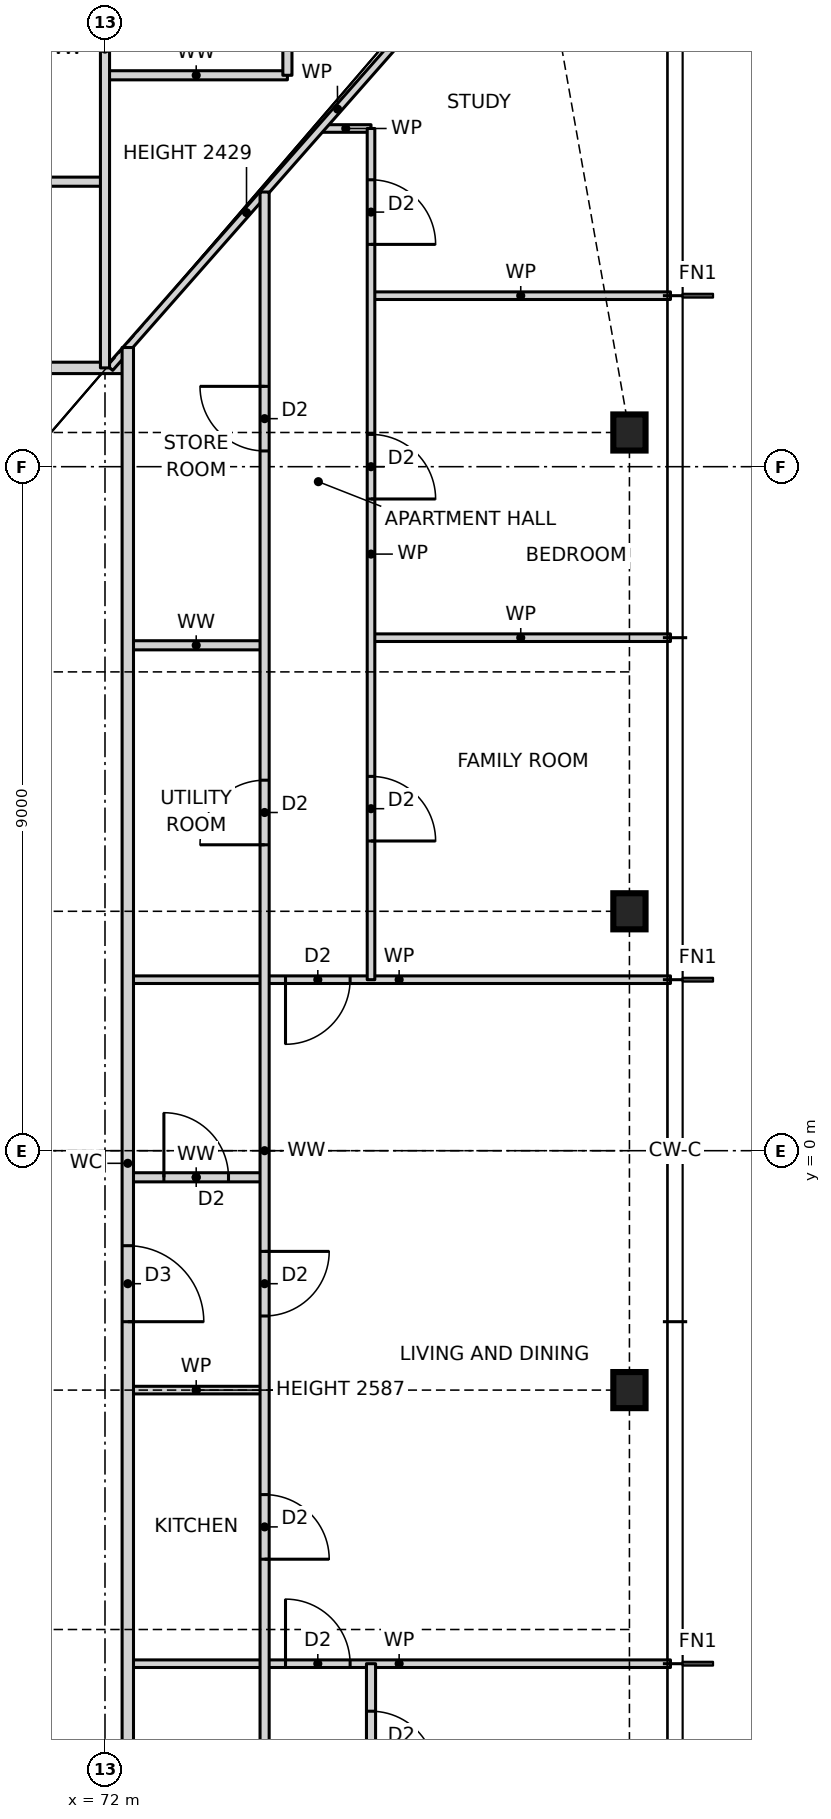
"""IFC4 building model, lengths in metres.
Left out: names, types, materials, properties, quantities, classifications, styles, units other than length and angle.
Written with IfcOpenShell. Run it as: python <this file> out.ifc"""

import sys

from ifc_helpers import new_model, si_unit, direction, frame, frame_2d, origin, origin_2d, place, context, subcontext, project, spatial, rectangle, i_section, extrude, element, fill, save


model = new_model("IFC4")
c1 = context("Model", 3, precision=1e-05, world=origin(), true_north=direction((0.0, 1.0)))
c2 = subcontext(c1, "Body", "Model", "MODEL_VIEW")
j1 = project(units=[si_unit("LENGTHUNIT", "METRE"), si_unit("PLANEANGLEUNIT", "RADIAN")], contexts=[c1])
p1 = place(None, origin())
s1 = spatial("IfcSite", under=j1, at=p1, CompositionType="ELEMENT")
p2 = place(p1, origin())
s2 = spatial("IfcBuilding", under=s1, at=p2, CompositionType="ELEMENT")
p3 = place(p2, frame((0.0, 0.0, 60.5)))
s3 = spatial("IfcBuildingStorey", under=s2, at=p3, CompositionType="ELEMENT", Elevation=60.5)
for number, where, z_axis, x_axis in (
    (1, (78.9, -3.15, 0.0), (0.0, 0.0, 1.0), (1.0, 0.0, 0.0)),
    (2, (78.9, 3.15, 0.0), (0.0, 0.0, 1.0), (1.0, 0.0, 0.0)),
    (3, (78.9, 9.45, 0.0), (0.0, 0.0, 1.0), (1.0, 0.0, 0.0)),
):
    element("IfcColumn", number, at=place(p3, frame(where, z_axis=z_axis, x_axis=x_axis)), inside=s3, PredefinedType="COLUMN", context=c2, shape_type="SweptSolid", body=[
        extrude(i_section(OverallWidth=0.424, OverallDepth=0.475, WebThickness=0.048, FlangeThickness=0.077, at=origin_2d()), origin(), (0.0, 0.0, 1.0), 3.5),
    ])
p4 = place(p3, frame((72.3, -6.75, 0.0), z_axis=(0.0, 0.0, 1.0), x_axis=(1.0, 0.0, 0.0)))
e4 = element("IfcWall", 4, at=p4, inside=s3, PredefinedType="PARTITIONING", context=c2, shape_type="SweptSolid", body=[
    extrude(rectangle(XDim=7.14, YDim=0.1, at=frame_2d((3.57, 0.0))), origin(), (0.0, 0.0, 1.0), 3.27),
])
p5 = place(p4, frame((2.075, 0.0, 0.0)))
e5 = element("IfcOpeningElement", 5, at=p5, cuts=e4, PredefinedType="OPENING", context=c2, shape_type="SweptSolid", body=[
    extrude(rectangle(XDim=0.85, YDim=2.1, at=frame_2d((0.425, 1.05))), frame((0.0, 0.06, 0.0), z_axis=(0.0, -1.0, 0.0), x_axis=(1.0, 0.0, 0.0)), (0.0, 0.0, 1.0), 0.12),
])
p6 = place(p3, frame((72.3, -3.15, 0.0), z_axis=(0.0, 0.0, 1.0), x_axis=(1.0, 0.0, 0.0)))
e6 = element("IfcWall", 6, at=p6, inside=s3, PredefinedType="PARTITIONING", context=c2, shape_type="SweptSolid", body=[
    extrude(rectangle(XDim=1.8, YDim=0.1, at=frame_2d((0.9, 0.0))), origin(), (0.0, 0.0, 1.0), 2.587),
])
p7 = place(p3, frame((72.3, -0.35, 0.0), z_axis=(0.0, 0.0, 1.0), x_axis=(1.0, 0.0, 0.0)))
e7 = element("IfcWall", 7, at=p7, inside=s3, PredefinedType="PARTITIONING", context=c2, shape_type="SweptSolid", body=[
    extrude(rectangle(XDim=1.8, YDim=0.12, at=frame_2d((0.9, 0.0))), origin(), (0.0, 0.0, 1.0), 3.27),
])
p8 = place(p7, frame((0.475, 0.0, 0.0)))
e8 = element("IfcOpeningElement", 8, at=p8, cuts=e7, PredefinedType="OPENING", context=c2, shape_type="SweptSolid", body=[
    extrude(rectangle(XDim=0.85, YDim=2.1, at=frame_2d((0.425, 1.05))), frame((0.0, 0.07, 0.0), z_axis=(0.0, -1.0, 0.0), x_axis=(1.0, 0.0, 0.0)), (0.0, 0.0, 1.0), 0.14),
])
p9 = place(p3, frame((72.3, 2.25, 0.0), z_axis=(0.0, 0.0, 1.0), x_axis=(1.0, 0.0, 0.0)))
e9 = element("IfcWall", 9, at=p9, inside=s3, PredefinedType="PARTITIONING", context=c2, shape_type="SweptSolid", body=[
    extrude(rectangle(XDim=7.14, YDim=0.1, at=frame_2d((3.57, 0.0))), origin(), (0.0, 0.0, 1.0), 3.27),
])
p10 = place(p9, frame((2.075, 0.0, 0.0)))
e10 = element("IfcOpeningElement", 10, at=p10, cuts=e9, PredefinedType="OPENING", context=c2, shape_type="SweptSolid", body=[
    extrude(rectangle(XDim=0.85, YDim=2.1, at=frame_2d((0.425, 1.05))), frame((0.0, 0.06, 0.0), z_axis=(0.0, -1.0, 0.0), x_axis=(1.0, 0.0, 0.0)), (0.0, 0.0, 1.0), 0.12),
])
p11 = place(p3, frame((72.3, 6.65, 0.0), z_axis=(0.0, 0.0, 1.0), x_axis=(1.0, 0.0, 0.0)))
e11 = element("IfcWall", 11, at=p11, inside=s3, PredefinedType="PARTITIONING", context=c2, shape_type="SweptSolid", body=[
    extrude(rectangle(XDim=1.8, YDim=0.12, at=frame_2d((0.9, 0.0))), origin(), (0.0, 0.0, 1.0), 3.27),
])
p12 = place(p3, frame((75.5, 6.75, 0.0), z_axis=(0.0, 0.0, 1.0), x_axis=(1.0, 0.0, 0.0)))
e12 = element("IfcWall", 12, at=p12, inside=s3, PredefinedType="PARTITIONING", context=c2, shape_type="SweptSolid", body=[
    extrude(rectangle(XDim=3.94, YDim=0.1, at=frame_2d((1.97, 0.0))), origin(), (0.0, 0.0, 1.0), 3.27),
])
p13 = place(p3, frame((53.7, 10.3, 0.0), z_axis=(0.0, 0.0, 1.0), x_axis=(1.0, 0.0, 0.0)))
e13 = element("IfcWall", 13, at=p13, inside=s3, PredefinedType="PARTITIONING", context=c2, shape_type="SweptSolid", body=[
    extrude(rectangle(XDim=18.6, YDim=0.15, at=frame_2d((9.3, 0.0))), origin(), (0.0, 0.0, 1.0), 3.27),
])
p14 = place(p13, frame((12.8, 0.0, 0.0)))
e14 = element("IfcOpeningElement", 14, at=p14, cuts=e13, PredefinedType="OPENING", context=c2, shape_type="SweptSolid", body=[
    extrude(rectangle(XDim=1.0, YDim=2.1, at=frame_2d((0.5, 1.05))), frame((0.0, 0.085, 0.0), z_axis=(0.0, -1.0, 0.0), x_axis=(1.0, 0.0, 0.0)), (0.0, 0.0, 1.0), 0.17),
])
p15 = place(p3, frame((75.5, 11.25, 0.0), z_axis=(0.0, 0.0, 1.0), x_axis=(1.0, 0.0, 0.0)))
e15 = element("IfcWall", 15, at=p15, inside=s3, PredefinedType="PARTITIONING", context=c2, shape_type="SweptSolid", body=[
    extrude(rectangle(XDim=3.94, YDim=0.1, at=frame_2d((1.97, 0.0))), origin(), (0.0, 0.0, 1.0), 3.27),
])
p16 = place(p3, frame((51.8, 12.75, 0.0), z_axis=(0.0, 0.0, 1.0), x_axis=(1.0, 0.0, 0.0)))
e16 = element("IfcWall", 16, at=p16, inside=s3, PredefinedType="PARTITIONING", context=c2, shape_type="SweptSolid", body=[
    extrude(rectangle(XDim=20.2, YDim=0.12, at=frame_2d((10.1, 0.0))), origin(), (0.0, 0.0, 1.0), 3.27),
])
p17 = place(p16, frame((17.975, 0.0, 0.0)))
e17 = element("IfcOpeningElement", 17, at=p17, cuts=e16, PredefinedType="OPENING", context=c2, shape_type="SweptSolid", body=[
    extrude(rectangle(XDim=0.85, YDim=2.1, at=frame_2d((0.425, 1.05))), frame((0.0, 0.07, 0.0), z_axis=(0.0, -1.0, 0.0), x_axis=(1.0, 0.0, 0.0)), (0.0, 0.0, 1.0), 0.14),
])
p18 = place(p16, frame((14.775, 0.0, 0.0)))
e18 = element("IfcOpeningElement", 18, at=p18, cuts=e16, PredefinedType="OPENING", context=c2, shape_type="SweptSolid", body=[
    extrude(rectangle(XDim=0.85, YDim=2.1, at=frame_2d((0.425, 1.05))), frame((0.0, 0.07, 0.0), z_axis=(0.0, -1.0, 0.0), x_axis=(1.0, 0.0, 0.0)), (0.0, 0.0, 1.0), 0.14),
])
p19 = place(p16, frame((9.125, 0.0, 0.0)))
e19 = element("IfcOpeningElement", 19, at=p19, cuts=e16, PredefinedType="OPENING", context=c2, shape_type="SweptSolid", body=[
    extrude(rectangle(XDim=0.85, YDim=2.1, at=frame_2d((0.425, 1.05))), frame((0.0, 0.07, 0.0), z_axis=(0.0, -1.0, 0.0), x_axis=(1.0, 0.0, 0.0)), (0.0, 0.0, 1.0), 0.14),
])
p20 = place(p16, frame((3.525, 0.0, 0.0)))
e20 = element("IfcOpeningElement", 20, at=p20, cuts=e16, PredefinedType="OPENING", context=c2, shape_type="SweptSolid", body=[
    extrude(rectangle(XDim=0.85, YDim=2.1, at=frame_2d((0.425, 1.05))), frame((0.0, 0.07, 0.0), z_axis=(0.0, -1.0, 0.0), x_axis=(1.0, 0.0, 0.0)), (0.0, 0.0, 1.0), 0.14),
])
p21 = place(p3, frame((74.836, 13.45, 0.0), z_axis=(0.0, 0.0, 1.0), x_axis=(1.0, 0.0, 0.0)))
e21 = element("IfcWall", 21, at=p21, inside=s3, PredefinedType="PARTITIONING", context=c2, shape_type="SweptSolid", body=[
    extrude(rectangle(XDim=0.664, YDim=0.1, at=frame_2d((0.332, 0.0))), origin(), (0.0, 0.0, 1.0), 3.27),
])
p22 = place(p3, frame((72.0, 14.15, 0.0), z_axis=(0.0, 0.0, 1.0), x_axis=(1.0, 0.0, 0.0)))
e22 = element("IfcWall", 22, at=p22, inside=s3, PredefinedType="PARTITIONING", context=c2, shape_type="SweptSolid", body=[
    extrude(rectangle(XDim=2.4, YDim=0.12, at=frame_2d((1.2, 0.0))), origin(), (0.0, 0.0, 1.0), 3.27),
])
p23 = place(p3, frame((72.064, 10.3, 0.0), z_axis=(0.0, 0.0, 1.0), x_axis=(0.660700699661, 0.750649442461, 0.0)))
e23 = element("IfcWall", 23, at=p23, inside=s3, PredefinedType="PARTITIONING", context=c2, shape_type="SweptSolid", body=[
    extrude(rectangle(XDim=9.071, YDim=0.1, at=frame_2d((4.535, 0.0))), origin(), (0.0, 0.0, 1.0), 2.429),
])
p24 = place(p3, frame((75.5, -13.45, 0.0), z_axis=(0.0, 0.0, 1.0), x_axis=(0.0, 1.0, 0.0)))
e24 = element("IfcWall", 24, at=p24, inside=s3, PredefinedType="PARTITIONING", context=c2, shape_type="SweptSolid", body=[
    extrude(rectangle(XDim=6.7, YDim=0.12, at=frame_2d((3.35, 0.0))), origin(), (0.0, 0.0, 1.0), 3.27),
])
p25 = place(p24, frame((5.225, 0.0, 0.0)))
e25 = element("IfcOpeningElement", 25, at=p25, cuts=e24, PredefinedType="OPENING", context=c2, shape_type="SweptSolid", body=[
    extrude(rectangle(XDim=0.85, YDim=2.1, at=frame_2d((0.425, 1.05))), frame((0.0, 0.07, 0.0), z_axis=(0.0, -1.0, 0.0), x_axis=(1.0, 0.0, 0.0)), (0.0, 0.0, 1.0), 0.14),
])
p26 = place(p24, frame((0.675, 0.0, 0.0)))
e26 = element("IfcOpeningElement", 26, at=p26, cuts=e24, PredefinedType="OPENING", context=c2, shape_type="SweptSolid", body=[
    extrude(rectangle(XDim=0.85, YDim=2.1, at=frame_2d((0.425, 1.05))), frame((0.0, 0.07, 0.0), z_axis=(0.0, -1.0, 0.0), x_axis=(1.0, 0.0, 0.0)), (0.0, 0.0, 1.0), 0.14),
])
p27 = place(p3, frame((75.5, 2.25, 0.0), z_axis=(0.0, 0.0, 1.0), x_axis=(0.0, 1.0, 0.0)))
e27 = element("IfcWall", 27, at=p27, inside=s3, PredefinedType="PARTITIONING", context=c2, shape_type="SweptSolid", body=[
    extrude(rectangle(XDim=11.2, YDim=0.1, at=frame_2d((5.6, 0.0))), origin(), (0.0, 0.0, 1.0), 3.27),
])
p28 = place(p27, frame((1.825, 0.0, 0.0)))
e28 = element("IfcOpeningElement", 28, at=p28, cuts=e27, PredefinedType="OPENING", context=c2, shape_type="SweptSolid", body=[
    extrude(rectangle(XDim=0.85, YDim=2.1, at=frame_2d((0.425, 1.05))), frame((0.0, 0.06, 0.0), z_axis=(0.0, -1.0, 0.0), x_axis=(1.0, 0.0, 0.0)), (0.0, 0.0, 1.0), 0.12),
])
p29 = place(p27, frame((6.325, 0.0, 0.0)))
e29 = element("IfcOpeningElement", 29, at=p29, cuts=e27, PredefinedType="OPENING", context=c2, shape_type="SweptSolid", body=[
    extrude(rectangle(XDim=0.85, YDim=2.1, at=frame_2d((0.425, 1.05))), frame((0.0, 0.06, 0.0), z_axis=(0.0, -1.0, 0.0), x_axis=(1.0, 0.0, 0.0)), (0.0, 0.0, 1.0), 0.12),
])
p30 = place(p27, frame((9.675, 0.0, 0.0)))
e30 = element("IfcOpeningElement", 30, at=p30, cuts=e27, PredefinedType="OPENING", context=c2, shape_type="SweptSolid", body=[
    extrude(rectangle(XDim=0.85, YDim=2.1, at=frame_2d((0.425, 1.05))), frame((0.0, 0.06, 0.0), z_axis=(0.0, -1.0, 0.0), x_axis=(1.0, 0.0, 0.0)), (0.0, 0.0, 1.0), 0.12),
])
p31 = place(p3, frame((74.4, 14.15, 0.0), z_axis=(0.0, 0.0, 1.0), x_axis=(0.0, 1.0, 0.0)))
e31 = element("IfcWall", 31, at=p31, inside=s3, PredefinedType="PARTITIONING", context=c2, shape_type="SweptSolid", body=[
    extrude(rectangle(XDim=2.6, YDim=0.12, at=frame_2d((1.3, 0.0))), origin(), (0.0, 0.0, 1.0), 3.27),
])
p32 = place(p31, frame((0.875, 0.0, 0.0)))
e32 = element("IfcOpeningElement", 32, at=p32, cuts=e31, PredefinedType="OPENING", context=c2, shape_type="SweptSolid", body=[
    extrude(rectangle(XDim=0.85, YDim=2.1, at=frame_2d((0.425, 1.05))), frame((0.0, 0.07, 0.0), z_axis=(0.0, -1.0, 0.0), x_axis=(1.0, 0.0, 0.0)), (0.0, 0.0, 1.0), 0.14),
])
p33 = place(p3, frame((74.1, -12.614, 0.0), z_axis=(0.0, 0.0, 1.0), x_axis=(0.0, 1.0, 0.0)))
e33 = element("IfcWall", 33, at=p33, inside=s3, PredefinedType="PARTITIONING", context=c2, shape_type="SweptSolid", body=[
    extrude(rectangle(XDim=25.228, YDim=0.12, at=frame_2d((12.614, 0.0))), origin(), (0.0, 0.0, 1.0), 3.27),
])
p34 = place(p33, frame((7.239, 0.0, 0.0)))
e34 = element("IfcOpeningElement", 34, at=p34, cuts=e33, PredefinedType="OPENING", context=c2, shape_type="SweptSolid", body=[
    extrude(rectangle(XDim=0.85, YDim=2.1, at=frame_2d((0.425, 1.05))), frame((0.0, 0.07, 0.0), z_axis=(0.0, -1.0, 0.0), x_axis=(1.0, 0.0, 0.0)), (0.0, 0.0, 1.0), 0.14),
])
p35 = place(p33, frame((10.439, 0.0, 0.0)))
e35 = element("IfcOpeningElement", 35, at=p35, cuts=e33, PredefinedType="OPENING", context=c2, shape_type="SweptSolid", body=[
    extrude(rectangle(XDim=0.85, YDim=2.1, at=frame_2d((0.425, 1.05))), frame((0.0, 0.07, 0.0), z_axis=(0.0, -1.0, 0.0), x_axis=(1.0, 0.0, 0.0)), (0.0, 0.0, 1.0), 0.14),
])
p36 = place(p33, frame((2.507, 0.0, 0.0)))
e36 = element("IfcOpeningElement", 36, at=p36, cuts=e33, PredefinedType="OPENING", context=c2, shape_type="SweptSolid", body=[
    extrude(rectangle(XDim=0.85, YDim=2.1, at=frame_2d((0.425, 1.05))), frame((0.0, 0.07, 0.0), z_axis=(0.0, -1.0, 0.0), x_axis=(1.0, 0.0, 0.0)), (0.0, 0.0, 1.0), 0.14),
])
p37 = place(p33, frame((16.639, 0.0, 0.0)))
e37 = element("IfcOpeningElement", 37, at=p37, cuts=e33, PredefinedType="OPENING", context=c2, shape_type="SweptSolid", body=[
    extrude(rectangle(XDim=0.85, YDim=2.1, at=frame_2d((0.425, 1.05))), frame((0.0, 0.07, 0.0), z_axis=(0.0, -1.0, 0.0), x_axis=(1.0, 0.0, 0.0)), (0.0, 0.0, 1.0), 0.14),
])
p38 = place(p33, frame((21.821, 0.0, 0.0)))
e38 = element("IfcOpeningElement", 38, at=p38, cuts=e33, PredefinedType="OPENING", context=c2, shape_type="SweptSolid", body=[
    extrude(rectangle(XDim=0.85, YDim=2.1, at=frame_2d((0.425, 1.05))), frame((0.0, 0.07, 0.0), z_axis=(0.0, -1.0, 0.0), x_axis=(1.0, 0.0, 0.0)), (0.0, 0.0, 1.0), 0.14),
])
p39 = place(p3, frame((72.3, -10.9, 0.0), z_axis=(0.0, 0.0, 1.0), x_axis=(0.0, 1.0, 0.0)))
e39 = element("IfcWall", 39, at=p39, inside=s3, PredefinedType="PARTITIONING", context=c2, shape_type="SweptSolid", body=[
    extrude(rectangle(XDim=21.468, YDim=0.15, at=frame_2d((10.734, 0.0))), origin(), (0.0, 0.0, 1.0), 3.27),
])
p40 = place(p39, frame((8.65, 0.0, 0.0)))
e40 = element("IfcOpeningElement", 40, at=p40, cuts=e39, PredefinedType="OPENING", context=c2, shape_type="SweptSolid", body=[
    extrude(rectangle(XDim=1.0, YDim=2.1, at=frame_2d((0.5, 1.05))), frame((0.0, 0.085, 0.0), z_axis=(0.0, -1.0, 0.0), x_axis=(1.0, 0.0, 0.0)), (0.0, 0.0, 1.0), 0.17),
])
p41 = place(p3, frame((72.0, 10.3, 0.0), z_axis=(0.0, 0.0, 1.0), x_axis=(0.0, 1.0, 0.0)))
e41 = element("IfcWall", 41, at=p41, inside=s3, PredefinedType="PARTITIONING", context=c2, shape_type="SweptSolid", body=[
    extrude(rectangle(XDim=8.39, YDim=0.12, at=frame_2d((4.195, 0.0))), origin(), (0.0, 0.0, 1.0), 3.27),
])
p42 = place(p41, frame((6.55, 0.0, 0.0)))
e42 = element("IfcOpeningElement", 42, at=p42, cuts=e41, PredefinedType="OPENING", context=c2, shape_type="SweptSolid", body=[
    extrude(rectangle(XDim=0.85, YDim=2.1, at=frame_2d((0.425, 1.05))), frame((0.0, 0.07, 0.0), z_axis=(0.0, -1.0, 0.0), x_axis=(1.0, 0.0, 0.0)), (0.0, 0.0, 1.0), 0.14),
])
p43 = place(p34, frame((0.85, 0.0, 0.0), z_axis=(0.0, 0.0, 1.0), x_axis=(-1.0, 0.0, 0.0)))
e43 = element("IfcDoor", 43, at=p43, inside=s3, OperationType="SINGLE_SWING_RIGHT", PredefinedType="DOOR", context=c2, shape_type="SweptSolid", body=[
    extrude(rectangle(XDim=0.85, YDim=2.1, at=frame_2d((0.425, 1.05))), frame((0.0, 0.025, 0.0), z_axis=(0.0, -1.0, 0.0), x_axis=(1.0, 0.0, 0.0)), (0.0, 0.0, 1.0), 0.05),
])
fill(e34, e43)
p44 = place(p40, frame((1.0, 0.0, 0.0), z_axis=(0.0, 0.0, 1.0), x_axis=(-1.0, 0.0, 0.0)))
e44 = element("IfcDoor", 44, at=p44, inside=s3, OperationType="SINGLE_SWING_RIGHT", PredefinedType="DOOR", context=c2, shape_type="SweptSolid", body=[
    extrude(rectangle(XDim=1.0, YDim=2.1, at=frame_2d((0.5, 1.05))), frame((0.0, 0.025, 0.0), z_axis=(0.0, -1.0, 0.0), x_axis=(1.0, 0.0, 0.0)), (0.0, 0.0, 1.0), 0.05),
])
fill(e40, e44)
p45 = place(p35, frame((0.85, 0.0, 0.0), z_axis=(0.0, 0.0, 1.0), x_axis=(-1.0, 0.0, 0.0)))
e45 = element("IfcDoor", 45, at=p45, inside=s3, OperationType="SINGLE_SWING_LEFT", PredefinedType="DOOR", context=c2, shape_type="SweptSolid", body=[
    extrude(rectangle(XDim=0.85, YDim=2.1, at=frame_2d((0.425, 1.05))), frame((0.0, 0.025, 0.0), z_axis=(0.0, -1.0, 0.0), x_axis=(1.0, 0.0, 0.0)), (0.0, 0.0, 1.0), 0.05),
])
fill(e35, e45)
p46 = place(p8, origin())
e46 = element("IfcDoor", 46, at=p46, inside=s3, OperationType="SINGLE_SWING_LEFT", PredefinedType="DOOR", context=c2, shape_type="SweptSolid", body=[
    extrude(rectangle(XDim=0.85, YDim=2.1, at=frame_2d((0.425, 1.05))), frame((0.0, 0.025, 0.0), z_axis=(0.0, -1.0, 0.0), x_axis=(1.0, 0.0, 0.0)), (0.0, 0.0, 1.0), 0.05),
])
fill(e8, e46)
p47 = place(p5, origin())
e47 = element("IfcDoor", 47, at=p47, inside=s3, OperationType="SINGLE_SWING_LEFT", PredefinedType="DOOR", context=c2, shape_type="SweptSolid", body=[
    extrude(rectangle(XDim=0.85, YDim=2.1, at=frame_2d((0.425, 1.05))), frame((0.0, 0.025, 0.0), z_axis=(0.0, -1.0, 0.0), x_axis=(1.0, 0.0, 0.0)), (0.0, 0.0, 1.0), 0.05),
])
fill(e5, e47)
p48 = place(p25, frame((0.85, 0.0, 0.0), z_axis=(0.0, 0.0, 1.0), x_axis=(-1.0, 0.0, 0.0)))
e48 = element("IfcDoor", 48, at=p48, inside=s3, OperationType="SINGLE_SWING_RIGHT", PredefinedType="DOOR", context=c2, shape_type="SweptSolid", body=[
    extrude(rectangle(XDim=0.85, YDim=2.1, at=frame_2d((0.425, 1.05))), frame((0.0, 0.025, 0.0), z_axis=(0.0, -1.0, 0.0), x_axis=(1.0, 0.0, 0.0)), (0.0, 0.0, 1.0), 0.05),
])
fill(e25, e48)
p49 = place(p10, frame((0.85, 0.0, 0.0), z_axis=(0.0, 0.0, 1.0), x_axis=(-1.0, 0.0, 0.0)))
e49 = element("IfcDoor", 49, at=p49, inside=s3, OperationType="SINGLE_SWING_RIGHT", PredefinedType="DOOR", context=c2, shape_type="SweptSolid", body=[
    extrude(rectangle(XDim=0.85, YDim=2.1, at=frame_2d((0.425, 1.05))), frame((0.0, 0.025, 0.0), z_axis=(0.0, -1.0, 0.0), x_axis=(1.0, 0.0, 0.0)), (0.0, 0.0, 1.0), 0.05),
])
fill(e10, e49)
p50 = place(p28, frame((0.85, 0.0, 0.0), z_axis=(0.0, 0.0, 1.0), x_axis=(-1.0, 0.0, 0.0)))
e50 = element("IfcDoor", 50, at=p50, inside=s3, OperationType="SINGLE_SWING_RIGHT", PredefinedType="DOOR", context=c2, shape_type="SweptSolid", body=[
    extrude(rectangle(XDim=0.85, YDim=2.1, at=frame_2d((0.425, 1.05))), frame((0.0, 0.025, 0.0), z_axis=(0.0, -1.0, 0.0), x_axis=(1.0, 0.0, 0.0)), (0.0, 0.0, 1.0), 0.05),
])
fill(e28, e50)
p51 = place(p29, frame((0.85, 0.0, 0.0), z_axis=(0.0, 0.0, 1.0), x_axis=(-1.0, 0.0, 0.0)))
e51 = element("IfcDoor", 51, at=p51, inside=s3, OperationType="SINGLE_SWING_RIGHT", PredefinedType="DOOR", context=c2, shape_type="SweptSolid", body=[
    extrude(rectangle(XDim=0.85, YDim=2.1, at=frame_2d((0.425, 1.05))), frame((0.0, 0.025, 0.0), z_axis=(0.0, -1.0, 0.0), x_axis=(1.0, 0.0, 0.0)), (0.0, 0.0, 1.0), 0.05),
])
fill(e29, e51)
p52 = place(p30, frame((0.85, 0.0, 0.0), z_axis=(0.0, 0.0, 1.0), x_axis=(-1.0, 0.0, 0.0)))
e52 = element("IfcDoor", 52, at=p52, inside=s3, OperationType="SINGLE_SWING_RIGHT", PredefinedType="DOOR", context=c2, shape_type="SweptSolid", body=[
    extrude(rectangle(XDim=0.85, YDim=2.1, at=frame_2d((0.425, 1.05))), frame((0.0, 0.025, 0.0), z_axis=(0.0, -1.0, 0.0), x_axis=(1.0, 0.0, 0.0)), (0.0, 0.0, 1.0), 0.05),
])
fill(e30, e52)
p53 = place(p37, origin())
e53 = element("IfcDoor", 53, at=p53, inside=s3, OperationType="SINGLE_SWING_LEFT", PredefinedType="DOOR", context=c2, shape_type="SweptSolid", body=[
    extrude(rectangle(XDim=0.85, YDim=2.1, at=frame_2d((0.425, 1.05))), frame((0.0, 0.025, 0.0), z_axis=(0.0, -1.0, 0.0), x_axis=(1.0, 0.0, 0.0)), (0.0, 0.0, 1.0), 0.05),
])
fill(e37, e53)
p54 = place(p38, origin())
e54 = element("IfcDoor", 54, at=p54, inside=s3, OperationType="SINGLE_SWING_RIGHT", PredefinedType="DOOR", context=c2, shape_type="SweptSolid", body=[
    extrude(rectangle(XDim=0.85, YDim=2.1, at=frame_2d((0.425, 1.05))), frame((0.0, 0.025, 0.0), z_axis=(0.0, -1.0, 0.0), x_axis=(1.0, 0.0, 0.0)), (0.0, 0.0, 1.0), 0.05),
])
fill(e38, e54)
save(model, sys.argv[1])
